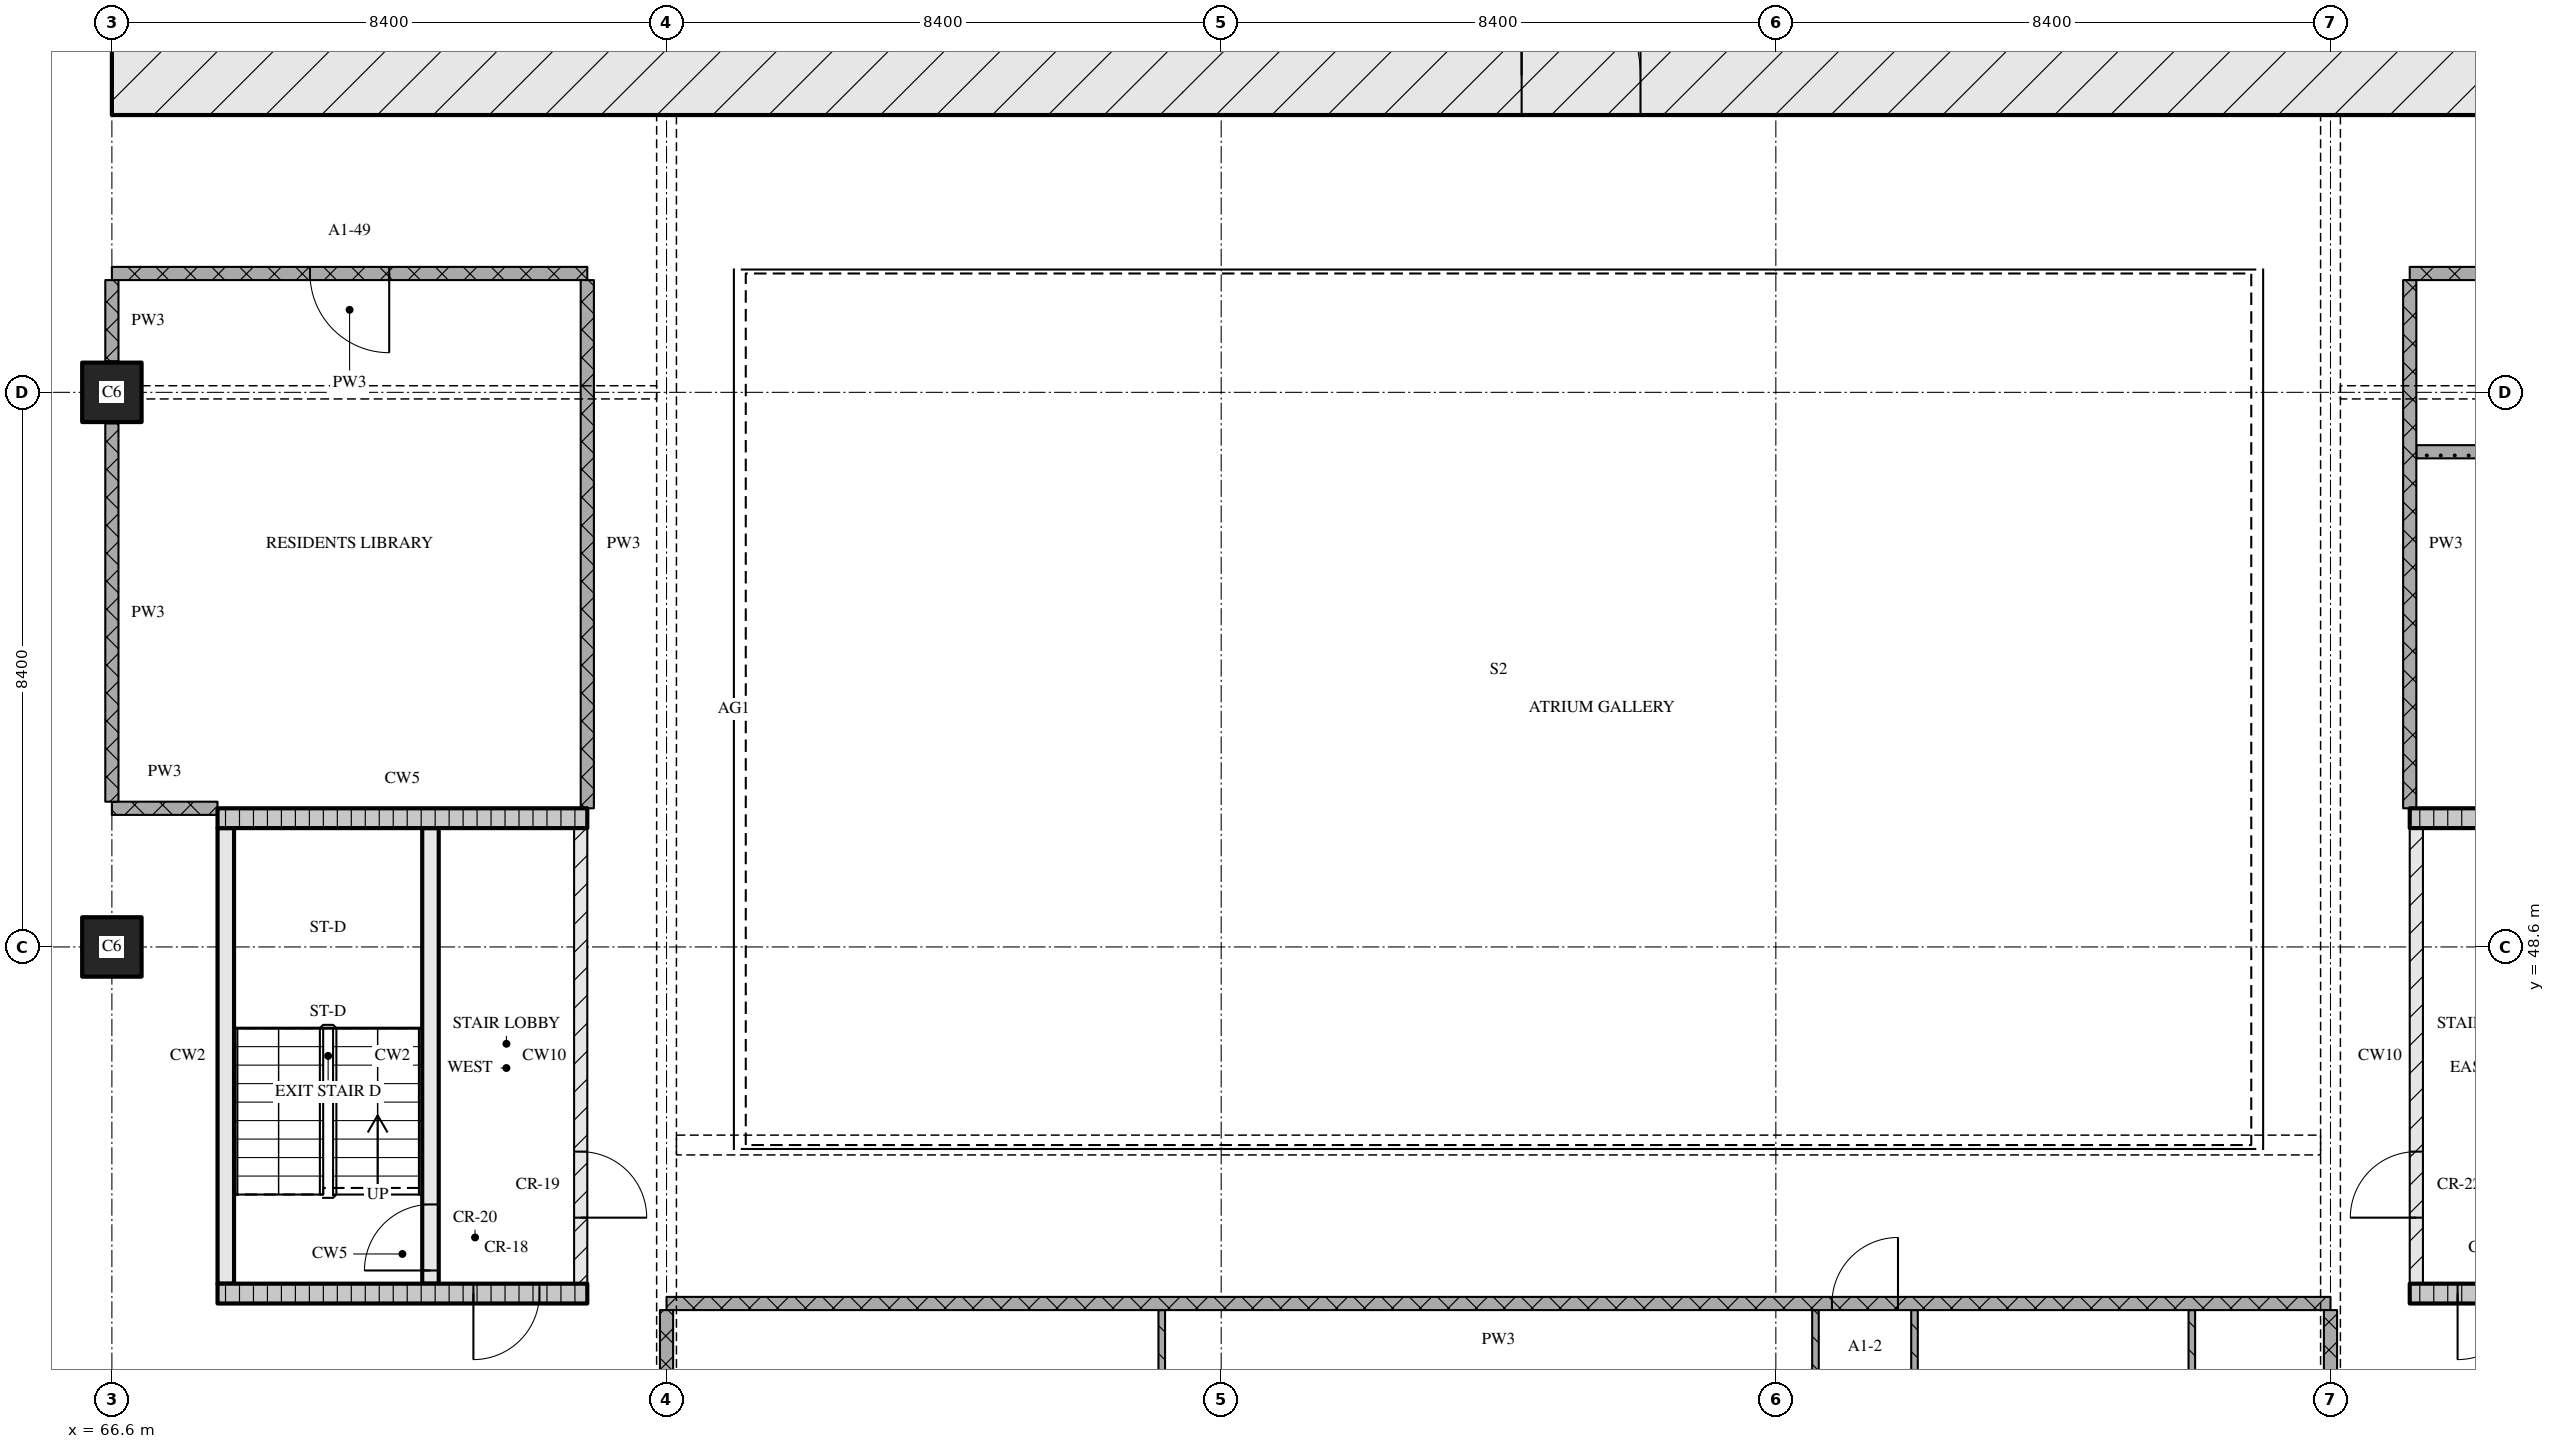
"""IFC4 building model, lengths in metres.
Left out: names, types, materials, properties, quantities, classifications, styles, units other than length and angle.
Written with IfcOpenShell. Run it as: python <this file> out.ifc"""

import sys

from ifc_helpers import new_model, si_unit, direction, frame, frame_2d, origin, origin_2d, place, context, subcontext, project, spatial, rectangle, extrude, element, fill, save


model = new_model("IFC4")
c1 = context("Model", 3, precision=1e-05, world=origin(), true_north=direction((0.0, 1.0)))
c2 = subcontext(c1, "Body", "Model", "MODEL_VIEW")
j1 = project(units=[si_unit("LENGTHUNIT", "METRE"), si_unit("PLANEANGLEUNIT", "RADIAN")], contexts=[c1])
p1 = place(None, origin())
s1 = spatial("IfcSite", under=j1, at=p1, CompositionType="ELEMENT")
p2 = place(p1, origin())
s2 = spatial("IfcBuilding", under=s1, at=p2, CompositionType="ELEMENT")
p3 = place(p2, frame((0.0, 0.0, 44.4)))
s3 = spatial("IfcBuildingStorey", under=s2, at=p3, CompositionType="ELEMENT", Elevation=44.4)
for number, where, z_axis, x_axis in (
    (1, (66.6, 48.6, 0.0), (0.0, 0.0, 1.0), (1.0, 0.0, 0.0)),
    (2, (66.6, 57.0, 0.0), (0.0, 0.0, 1.0), (1.0, 0.0, 0.0)),
):
    element("IfcColumn", number, at=place(p3, frame(where, z_axis=z_axis, x_axis=x_axis)), inside=s3, PredefinedType="COLUMN", context=c2, shape_type="SweptSolid", body=[
        extrude(rectangle(XDim=0.9, YDim=0.9, at=origin_2d()), origin(), (0.0, 0.0, 1.0), 3.6),
    ])
p4 = place(p3, frame((66.6, 61.8, 0.0), z_axis=(0.0, 0.0, 1.0), x_axis=(1.0, 0.0, 0.0)))
e3 = element("IfcWall", 3, at=p4, inside=s3, PredefinedType="SOLIDWALL", context=c2, shape_type="SweptSolid", body=[
    extrude(rectangle(XDim=42.0, YDim=1.2, at=frame_2d((21.0, 0.0))), origin(), (0.0, 0.0, 1.0), 3.32),
])
p5 = place(p4, frame((21.35, 0.0, 0.0)))
e4 = element("IfcOpeningElement", 4, at=p5, cuts=e3, PredefinedType="OPENING", context=c2, shape_type="SweptSolid", body=[
    extrude(rectangle(XDim=1.8, YDim=2.1, at=frame_2d((0.9, 1.05))), frame((0.0, 0.61, 0.0), z_axis=(0.0, -1.0, 0.0), x_axis=(1.0, 0.0, 0.0)), (0.0, 0.0, 1.0), 1.22),
])
p6 = place(p3, frame((68.2, 43.35, 0.0), z_axis=(0.0, 0.0, 1.0), x_axis=(1.0, 0.0, 0.0)))
e5 = element("IfcWall", 5, at=p6, inside=s3, PredefinedType="SOLIDWALL", context=c2, shape_type="SweptSolid", body=[
    extrude(rectangle(XDim=5.6, YDim=0.3, at=frame_2d((2.8, 0.0))), origin(), (0.0, 0.0, 1.0), 3.32),
])
p7 = place(p6, frame((3.875, 0.0, 0.0)))
e6 = element("IfcOpeningElement", 6, at=p7, cuts=e5, PredefinedType="OPENING", context=c2, shape_type="SweptSolid", body=[
    extrude(rectangle(XDim=1.0, YDim=2.1, at=frame_2d((0.5, 1.05))), frame((0.0, 0.16, 0.0), z_axis=(0.0, -1.0, 0.0), x_axis=(1.0, 0.0, 0.0)), (0.0, 0.0, 1.0), 0.32),
])
p8 = place(p3, frame((68.325, 43.5, 0.0), z_axis=(0.0, 0.0, 1.0), x_axis=(0.0, 1.0, 0.0)))
e7 = element("IfcWall", 7, at=p8, inside=s3, PredefinedType="SOLIDWALL", context=c2, shape_type="SweptSolid", body=[
    extrude(rectangle(XDim=6.9, YDim=0.25, at=frame_2d((3.45, 0.0))), origin(), (0.0, 0.0, 1.0), 3.32),
])
p9 = place(p3, frame((71.425, 43.5, 0.0), z_axis=(0.0, 0.0, 1.0), x_axis=(0.0, 1.0, 0.0)))
e8 = element("IfcWall", 8, at=p9, inside=s3, PredefinedType="SOLIDWALL", context=c2, shape_type="SweptSolid", body=[
    extrude(rectangle(XDim=6.9, YDim=0.25, at=frame_2d((3.45, 0.0))), origin(), (0.0, 0.0, 1.0), 3.32),
])
p10 = place(p9, frame((0.2, 0.0, 0.0)))
e9 = element("IfcOpeningElement", 9, at=p10, cuts=e8, PredefinedType="OPENING", context=c2, shape_type="SweptSolid", body=[
    extrude(rectangle(XDim=1.0, YDim=2.1, at=frame_2d((0.5, 1.05))), frame((0.0, 0.135, 0.0), z_axis=(0.0, -1.0, 0.0), x_axis=(1.0, 0.0, 0.0)), (0.0, 0.0, 1.0), 0.27),
])
p11 = place(p3, frame((73.7, 43.5, 0.0), z_axis=(0.0, 0.0, 1.0), x_axis=(0.0, 1.0, 0.0)))
e10 = element("IfcWall", 10, at=p11, inside=s3, PredefinedType="PARTITIONING", context=c2, shape_type="SweptSolid", body=[
    extrude(rectangle(XDim=6.9, YDim=0.2, at=frame_2d((3.45, 0.0))), origin(), (0.0, 0.0, 1.0), 3.32),
])
p12 = place(p11, frame((1.0, 0.0, 0.0)))
e11 = element("IfcOpeningElement", 11, at=p12, cuts=e10, PredefinedType="OPENING", context=c2, shape_type="SweptSolid", body=[
    extrude(rectangle(XDim=1.0, YDim=2.1, at=frame_2d((0.5, 1.05))), frame((0.0, 0.11, 0.0), z_axis=(0.0, -1.0, 0.0), x_axis=(1.0, 0.0, 0.0)), (0.0, 0.0, 1.0), 0.22),
])
p13 = place(p3, frame((68.2, 50.55, 0.0), z_axis=(0.0, 0.0, 1.0), x_axis=(1.0, 0.0, 0.0)))
e12 = element("IfcWall", 12, at=p13, inside=s3, PredefinedType="SOLIDWALL", context=c2, shape_type="SweptSolid", body=[
    extrude(rectangle(XDim=5.6, YDim=0.3, at=frame_2d((2.8, 0.0))), origin(), (0.0, 0.0, 1.0), 3.32),
])
p14 = place(p3, frame((101.4, 43.35, 0.0), z_axis=(0.0, 0.0, 1.0), x_axis=(1.0, 0.0, 0.0)))
e13 = element("IfcWall", 13, at=p14, inside=s3, PredefinedType="SOLIDWALL", context=c2, shape_type="SweptSolid", body=[
    extrude(rectangle(XDim=5.6, YDim=0.3, at=frame_2d((2.8, 0.0))), origin(), (0.0, 0.0, 1.0), 3.32),
])
p15 = place(p14, frame((0.725, 0.0, 0.0)))
e14 = element("IfcOpeningElement", 14, at=p15, cuts=e13, PredefinedType="OPENING", context=c2, shape_type="SweptSolid", body=[
    extrude(rectangle(XDim=1.0, YDim=2.1, at=frame_2d((0.5, 1.05))), frame((0.0, 0.16, 0.0), z_axis=(0.0, -1.0, 0.0), x_axis=(1.0, 0.0, 0.0)), (0.0, 0.0, 1.0), 0.32),
])
p16 = place(p3, frame((101.5, 43.5, 0.0), z_axis=(0.0, 0.0, 1.0), x_axis=(0.0, 1.0, 0.0)))
e15 = element("IfcWall", 15, at=p16, inside=s3, PredefinedType="PARTITIONING", context=c2, shape_type="SweptSolid", body=[
    extrude(rectangle(XDim=6.9, YDim=0.2, at=frame_2d((3.45, 0.0))), origin(), (0.0, 0.0, 1.0), 3.32),
])
p17 = place(p16, frame((1.0, 0.0, 0.0)))
e16 = element("IfcOpeningElement", 16, at=p17, cuts=e15, PredefinedType="OPENING", context=c2, shape_type="SweptSolid", body=[
    extrude(rectangle(XDim=1.0, YDim=2.1, at=frame_2d((0.5, 1.05))), frame((0.0, 0.11, 0.0), z_axis=(0.0, -1.0, 0.0), x_axis=(1.0, 0.0, 0.0)), (0.0, 0.0, 1.0), 0.22),
])
p18 = place(p3, frame((101.4, 50.55, 0.0), z_axis=(0.0, 0.0, 1.0), x_axis=(1.0, 0.0, 0.0)))
e17 = element("IfcWall", 17, at=p18, inside=s3, PredefinedType="SOLIDWALL", context=c2, shape_type="SweptSolid", body=[
    extrude(rectangle(XDim=5.6, YDim=0.3, at=frame_2d((2.8, 0.0))), origin(), (0.0, 0.0, 1.0), 3.32),
])
p19 = place(p3, frame((100.2, 43.2, 0.0), z_axis=(0.0, 0.0, 1.0), x_axis=(-1.0, 0.0, 0.0)))
e18 = element("IfcWall", 18, at=p19, inside=s3, PredefinedType="PARTITIONING", context=c2, shape_type="SweptSolid", body=[
    extrude(rectangle(XDim=25.2, YDim=0.2, at=frame_2d((12.6, 0.0))), origin(), (0.0, 0.0, 1.0), 3.32),
])
p20 = place(p19, frame((6.55, 0.0, 0.0)))
e19 = element("IfcOpeningElement", 19, at=p20, cuts=e18, PredefinedType="OPENING", context=c2, shape_type="SweptSolid", body=[
    extrude(rectangle(XDim=1.0, YDim=2.1, at=frame_2d((0.5, 1.05))), frame((0.0, 0.11, 0.0), z_axis=(0.0, -1.0, 0.0), x_axis=(1.0, 0.0, 0.0)), (0.0, 0.0, 1.0), 0.22),
])
p21 = place(p3, frame((66.6, 50.7, 0.0), z_axis=(0.0, 0.0, 1.0), x_axis=(1.0, 0.0, 0.0)))
e20 = element("IfcWall", 20, at=p21, inside=s3, PredefinedType="PARTITIONING", context=c2, shape_type="SweptSolid", body=[
    extrude(rectangle(XDim=1.6, YDim=0.2, at=frame_2d((0.8, 0.0))), origin(), (0.0, 0.0, 1.0), 3.32),
])
p22 = place(p3, frame((101.5, 56.1, 0.0), z_axis=(0.0, 0.0, 1.0), x_axis=(1.0, 0.0, 0.0)))
e21 = element("IfcWall", 21, at=p22, inside=s3, PredefinedType="PARTITIONING", context=c2, shape_type="SweptSolid", body=[
    extrude(rectangle(XDim=7.0, YDim=0.2, at=frame_2d((3.5, 0.0))), origin(), (0.0, 0.0, 1.0), 3.32),
])
p23 = place(p3, frame((73.8, 58.8, 0.0), z_axis=(0.0, 0.0, 1.0), x_axis=(-1.0, 0.0, 0.0)))
e22 = element("IfcWall", 22, at=p23, inside=s3, PredefinedType="PARTITIONING", context=c2, shape_type="SweptSolid", body=[
    extrude(rectangle(XDim=7.2, YDim=0.2, at=frame_2d((3.6, 0.0))), origin(), (0.0, 0.0, 1.0), 3.32),
])
p24 = place(p23, frame((3.0, 0.0, 0.0)))
e23 = element("IfcOpeningElement", 23, at=p24, cuts=e22, PredefinedType="OPENING", context=c2, shape_type="SweptSolid", body=[
    extrude(rectangle(XDim=1.2, YDim=2.1, at=frame_2d((0.6, 1.05))), frame((0.0, 0.11, 0.0), z_axis=(0.0, -1.0, 0.0), x_axis=(1.0, 0.0, 0.0)), (0.0, 0.0, 1.0), 0.22),
])
p25 = place(p3, frame((101.4, 58.8, 0.0), z_axis=(0.0, 0.0, 1.0), x_axis=(1.0, 0.0, 0.0)))
e24 = element("IfcWall", 24, at=p25, inside=s3, PredefinedType="PARTITIONING", context=c2, shape_type="SweptSolid", body=[
    extrude(rectangle(XDim=7.2, YDim=0.2, at=frame_2d((3.6, 0.0))), origin(), (0.0, 0.0, 1.0), 3.32),
])
p26 = place(p3, frame((66.6, 56.53, 0.0), z_axis=(0.0, 0.0, 1.0), x_axis=(0.0, -1.0, 0.0)))
e25 = element("IfcWall", 25, at=p26, inside=s3, PredefinedType="PARTITIONING", context=c2, shape_type="SweptSolid", body=[
    extrude(rectangle(XDim=5.73, YDim=0.2, at=frame_2d((2.865, 0.0))), origin(), (0.0, 0.0, 1.0), 3.32),
])
p27 = place(p3, frame((66.6, 58.7, 0.0), z_axis=(0.0, 0.0, 1.0), x_axis=(0.0, -1.0, 0.0)))
e26 = element("IfcWall", 26, at=p27, inside=s3, PredefinedType="PARTITIONING", context=c2, shape_type="SweptSolid", body=[
    extrude(rectangle(XDim=1.23, YDim=0.2, at=frame_2d((0.615, 0.0))), origin(), (0.0, 0.0, 1.0), 3.32),
])
p28 = place(p3, frame((73.8, 58.7, 0.0), z_axis=(0.0, 0.0, 1.0), x_axis=(0.0, -1.0, 0.0)))
e27 = element("IfcWall", 27, at=p28, inside=s3, PredefinedType="PARTITIONING", context=c2, shape_type="SweptSolid", body=[
    extrude(rectangle(XDim=8.0, YDim=0.2, at=frame_2d((4.0, 0.0))), origin(), (0.0, 0.0, 1.0), 3.32),
])
p29 = place(p3, frame((75.0, 43.1, 0.0), z_axis=(0.0, 0.0, 1.0), x_axis=(0.0, -1.0, 0.0)))
e28 = element("IfcWall", 28, at=p29, inside=s3, PredefinedType="PARTITIONING", context=c2, shape_type="SweptSolid", body=[
    extrude(rectangle(XDim=2.2, YDim=0.2, at=frame_2d((1.1, 0.0))), origin(), (0.0, 0.0, 1.0), 2.43),
])
p30 = place(p3, frame((82.5, 43.1, 0.0), z_axis=(0.0, 0.0, 1.0), x_axis=(0.0, -1.0, 0.0)))
e29 = element("IfcWall", 29, at=p30, inside=s3, PredefinedType="PARTITIONING", context=c2, shape_type="SweptSolid", body=[
    extrude(rectangle(XDim=4.35, YDim=0.1, at=frame_2d((2.175, 0.0))), origin(), (0.0, 0.0, 1.0), 3.32),
])
p31 = place(p3, frame((92.4, 38.75, 0.0), z_axis=(0.0, 0.0, 1.0), x_axis=(0.0, 1.0, 0.0)))
e30 = element("IfcWall", 30, at=p31, inside=s3, PredefinedType="PARTITIONING", context=c2, shape_type="SweptSolid", body=[
    extrude(rectangle(XDim=4.35, YDim=0.1, at=frame_2d((2.175, 0.0))), origin(), (0.0, 0.0, 1.0), 3.32),
])
p32 = place(p31, frame((2.05, 0.0, 0.0)))
e31 = element("IfcOpeningElement", 31, at=p32, cuts=e30, PredefinedType="OPENING", context=c2, shape_type="SweptSolid", body=[
    extrude(rectangle(XDim=0.9, YDim=2.1, at=frame_2d((0.45, 1.05))), frame((0.0, 0.06, 0.0), z_axis=(0.0, -1.0, 0.0), x_axis=(1.0, 0.0, 0.0)), (0.0, 0.0, 1.0), 0.12),
])
p33 = place(p3, frame((93.9, 43.1, 0.0), z_axis=(0.0, 0.0, 1.0), x_axis=(0.0, -1.0, 0.0)))
e32 = element("IfcWall", 32, at=p33, inside=s3, PredefinedType="PARTITIONING", context=c2, shape_type="SweptSolid", body=[
    extrude(rectangle(XDim=4.35, YDim=0.1, at=frame_2d((2.175, 0.0))), origin(), (0.0, 0.0, 1.0), 3.32),
])
p34 = place(p33, frame((1.75, 0.0, 0.0)))
e33 = element("IfcOpeningElement", 33, at=p34, cuts=e32, PredefinedType="OPENING", context=c2, shape_type="SweptSolid", body=[
    extrude(rectangle(XDim=0.8, YDim=2.1, at=frame_2d((0.4, 1.05))), frame((0.0, 0.06, 0.0), z_axis=(0.0, -1.0, 0.0), x_axis=(1.0, 0.0, 0.0)), (0.0, 0.0, 1.0), 0.12),
])
p35 = place(p3, frame((98.1, 43.1, 0.0), z_axis=(0.0, 0.0, 1.0), x_axis=(0.0, -1.0, 0.0)))
e34 = element("IfcWall", 34, at=p35, inside=s3, PredefinedType="PARTITIONING", context=c2, shape_type="SweptSolid", body=[
    extrude(rectangle(XDim=4.35, YDim=0.1, at=frame_2d((2.175, 0.0))), origin(), (0.0, 0.0, 1.0), 3.32),
])
p36 = place(p3, frame((100.2, 43.1, 0.0), z_axis=(0.0, 0.0, 1.0), x_axis=(0.0, -1.0, 0.0)))
e35 = element("IfcWall", 35, at=p36, inside=s3, PredefinedType="PARTITIONING", context=c2, shape_type="SweptSolid", body=[
    extrude(rectangle(XDim=2.2, YDim=0.2, at=frame_2d((1.1, 0.0))), origin(), (0.0, 0.0, 1.0), 2.43),
])
p37 = place(p3, frame((101.4, 58.7, 0.0), z_axis=(0.0, 0.0, 1.0), x_axis=(0.0, -1.0, 0.0)))
e36 = element("IfcWall", 36, at=p37, inside=s3, PredefinedType="PARTITIONING", context=c2, shape_type="SweptSolid", body=[
    extrude(rectangle(XDim=8.0, YDim=0.2, at=frame_2d((4.0, 0.0))), origin(), (0.0, 0.0, 1.0), 3.32),
])
p38 = place(p5, origin())
e37 = element("IfcDoor", 37, at=p38, inside=s3, OperationType="DOUBLE_DOOR_SINGLE_SWING", PredefinedType="DOOR", context=c2, shape_type="SweptSolid", body=[
    extrude(rectangle(XDim=1.8, YDim=2.1, at=frame_2d((0.9, 1.05))), frame((0.0, 0.025, 0.0), z_axis=(0.0, -1.0, 0.0), x_axis=(1.0, 0.0, 0.0)), (0.0, 0.0, 1.0), 0.05),
])
fill(e4, e37)
p39 = place(p7, origin())
e38 = element("IfcDoor", 38, at=p39, inside=s3, OperationType="SINGLE_SWING_RIGHT", PredefinedType="DOOR", context=c2, shape_type="SweptSolid", body=[
    extrude(rectangle(XDim=1.0, YDim=2.1, at=frame_2d((0.5, 1.05))), frame((0.0, 0.025, 0.0), z_axis=(0.0, -1.0, 0.0), x_axis=(1.0, 0.0, 0.0)), (0.0, 0.0, 1.0), 0.05),
])
fill(e6, e38)
p40 = place(p10, origin())
e39 = element("IfcDoor", 39, at=p40, inside=s3, OperationType="SINGLE_SWING_LEFT", PredefinedType="DOOR", context=c2, shape_type="SweptSolid", body=[
    extrude(rectangle(XDim=1.0, YDim=2.1, at=frame_2d((0.5, 1.05))), frame((0.0, 0.025, 0.0), z_axis=(0.0, -1.0, 0.0), x_axis=(1.0, 0.0, 0.0)), (0.0, 0.0, 1.0), 0.05),
])
fill(e9, e39)
p41 = place(p12, origin())
e40 = element("IfcDoor", 40, at=p41, inside=s3, OperationType="SINGLE_SWING_RIGHT", PredefinedType="DOOR", context=c2, shape_type="SweptSolid", body=[
    extrude(rectangle(XDim=1.0, YDim=2.1, at=frame_2d((0.5, 1.05))), frame((0.0, 0.025, 0.0), z_axis=(0.0, -1.0, 0.0), x_axis=(1.0, 0.0, 0.0)), (0.0, 0.0, 1.0), 0.05),
])
fill(e11, e40)
p42 = place(p15, origin())
e41 = element("IfcDoor", 41, at=p42, inside=s3, OperationType="SINGLE_SWING_RIGHT", PredefinedType="DOOR", context=c2, shape_type="SweptSolid", body=[
    extrude(rectangle(XDim=1.0, YDim=2.1, at=frame_2d((0.5, 1.05))), frame((0.0, 0.025, 0.0), z_axis=(0.0, -1.0, 0.0), x_axis=(1.0, 0.0, 0.0)), (0.0, 0.0, 1.0), 0.05),
])
fill(e14, e41)
p43 = place(p17, origin())
e42 = element("IfcDoor", 42, at=p43, inside=s3, OperationType="SINGLE_SWING_LEFT", PredefinedType="DOOR", context=c2, shape_type="SweptSolid", body=[
    extrude(rectangle(XDim=1.0, YDim=2.1, at=frame_2d((0.5, 1.05))), frame((0.0, 0.025, 0.0), z_axis=(0.0, -1.0, 0.0), x_axis=(1.0, 0.0, 0.0)), (0.0, 0.0, 1.0), 0.05),
])
fill(e16, e42)
p44 = place(p20, origin())
e43 = element("IfcDoor", 43, at=p44, inside=s3, OperationType="SINGLE_SWING_RIGHT", PredefinedType="DOOR", context=c2, shape_type="SweptSolid", body=[
    extrude(rectangle(XDim=1.0, YDim=2.1, at=frame_2d((0.5, 1.05))), frame((0.0, 0.025, 0.0), z_axis=(0.0, -1.0, 0.0), x_axis=(1.0, 0.0, 0.0)), (0.0, 0.0, 1.0), 0.05),
])
fill(e19, e43)
p45 = place(p24, origin())
e44 = element("IfcDoor", 44, at=p45, inside=s3, OperationType="SINGLE_SWING_LEFT", PredefinedType="DOOR", context=c2, shape_type="SweptSolid", body=[
    extrude(rectangle(XDim=1.2, YDim=2.1, at=frame_2d((0.6, 1.05))), frame((0.0, 0.025, 0.0), z_axis=(0.0, -1.0, 0.0), x_axis=(1.0, 0.0, 0.0)), (0.0, 0.0, 1.0), 0.05),
])
fill(e23, e44)
save(model, sys.argv[1])
